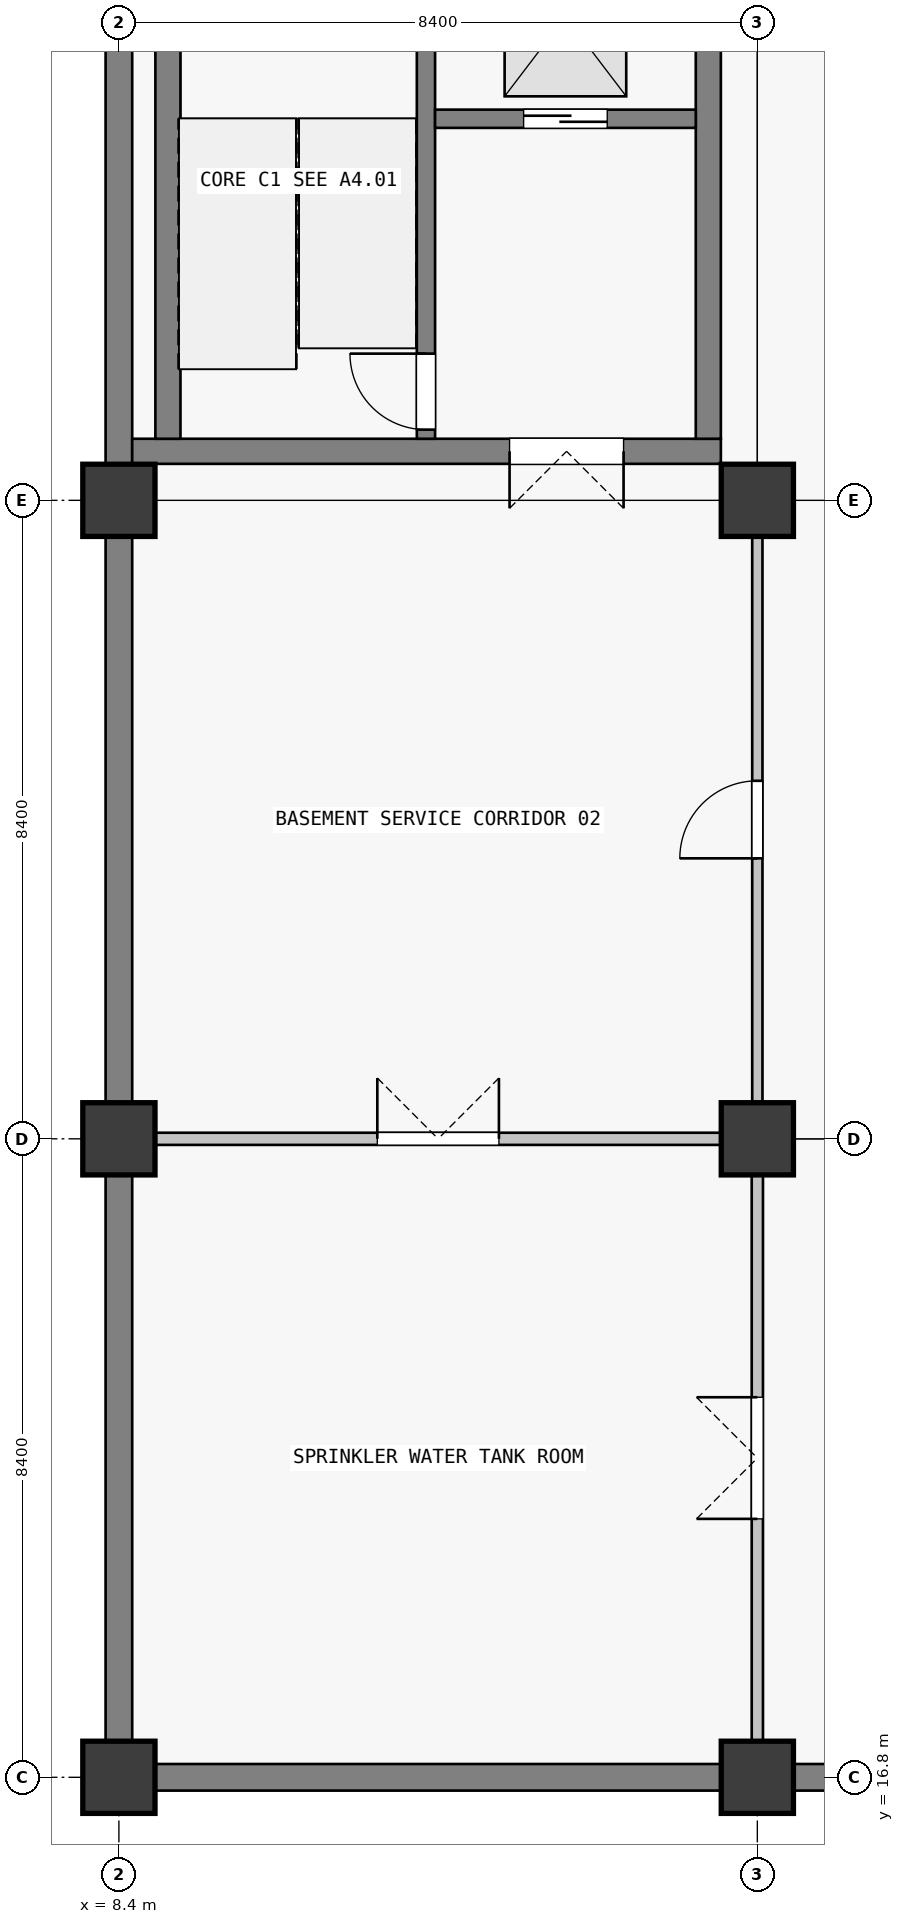
"""IFC4 building model, lengths in metres.
Left out: names, types, materials, properties, quantities, classifications, styles, units other than length and angle.
Written with IfcOpenShell. Run it as: python <this file> out.ifc"""

import sys

from ifc_helpers import new_model, si_unit, direction, frame, frame_2d, origin, origin_2d, place, context, subcontext, project, spatial, rectangle, extrude, element, fill, save


model = new_model("IFC4")
c1 = context("Model", 3, precision=1e-05, world=origin(), true_north=direction((0.0, 1.0)))
c2 = subcontext(c1, "Body", "Model", "MODEL_VIEW")
j1 = project(units=[si_unit("LENGTHUNIT", "METRE"), si_unit("PLANEANGLEUNIT", "RADIAN")], contexts=[c1])
p1 = place(None, origin())
s1 = spatial("IfcSite", under=j1, at=p1, CompositionType="ELEMENT")
p2 = place(p1, origin())
s2 = spatial("IfcBuilding", under=s1, at=p2, CompositionType="ELEMENT")
p3 = place(p2, frame((0.0, 0.0, -4.5)))
s3 = spatial("IfcBuildingStorey", under=s2, at=p3, CompositionType="ELEMENT", Elevation=-4.5)
for number, where, z_axis, x_axis in (
    (1, (8.4, 16.8, -0.35), (0.0, 0.0, 1.0), (1.0, 0.0, 0.0)),
    (2, (8.4, 25.2, -0.35), (0.0, 0.0, 1.0), (1.0, 0.0, 0.0)),
    (3, (8.4, 33.6, -0.35), (0.0, 0.0, 1.0), (1.0, 0.0, 0.0)),
    (4, (16.8, 16.8, -0.35), (0.0, 0.0, 1.0), (1.0, 0.0, 0.0)),
    (5, (16.8, 25.2, -0.35), (0.0, 0.0, 1.0), (1.0, 0.0, 0.0)),
    (6, (16.8, 33.6, -0.35), (0.0, 0.0, 1.0), (1.0, 0.0, 0.0)),
):
    element("IfcColumn", number, at=place(p3, frame(where, z_axis=z_axis, x_axis=x_axis)), inside=s3, PredefinedType="COLUMN", context=c2, shape_type="SweptSolid", body=[
        extrude(rectangle(XDim=0.95, YDim=0.95, at=origin_2d()), origin(), (0.0, 0.0, 1.0), 4.85),
    ])
p4 = place(p3, frame((16.324, 16.8, 0.0), z_axis=(0.0, 0.0, 1.0), x_axis=(-1.0, 0.0, 0.0)))
e7 = element("IfcWall", 7, at=p4, inside=s3, PredefinedType="SOLIDWALL", context=c2, shape_type="SweptSolid", body=[
    extrude(rectangle(XDim=7.448, YDim=0.35, at=frame_2d((3.724, 0.0))), origin(), (0.0, 0.0, 1.0), 3.35),
])
p5 = place(p3, frame((8.4, 17.276, 0.0), z_axis=(0.0, 0.0, 1.0), x_axis=(0.0, 1.0, 0.0)))
e8 = element("IfcWall", 8, at=p5, inside=s3, PredefinedType="SOLIDWALL", context=c2, shape_type="SweptSolid", body=[
    extrude(rectangle(XDim=7.448, YDim=0.35, at=frame_2d((3.724, 0.0))), origin(), (0.0, 0.0, 1.0), 3.35),
])
for number, where, z_axis, x_axis in (
    (9, (8.4, 25.676, 0.0), (0.0, 0.0, 1.0), (0.0, 1.0, 0.0)),
    (10, (8.4, 34.076, 0.0), (0.0, 0.0, 1.0), (0.0, 1.0, 0.0)),
):
    element("IfcWall", number, at=place(p3, frame(where, z_axis=z_axis, x_axis=x_axis)), inside=s3, PredefinedType="SOLIDWALL", context=c2, shape_type="SweptSolid", body=[
        extrude(rectangle(XDim=7.448, YDim=0.35, at=frame_2d((3.724, 0.0))), origin(), (0.0, 0.0, 1.0), 3.35),
    ])
p6 = place(p3, frame((24.724, 16.8, 0.0), z_axis=(0.0, 0.0, 1.0), x_axis=(-1.0, 0.0, 0.0)))
e11 = element("IfcWall", 11, at=p6, inside=s3, PredefinedType="SOLIDWALL", context=c2, shape_type="SweptSolid", body=[
    extrude(rectangle(XDim=7.448, YDim=0.35, at=frame_2d((3.724, 0.0))), origin(), (0.0, 0.0, 1.0), 3.35),
])
p7 = place(p3, frame((16.32, 34.245, -0.35), z_axis=(0.0, 0.0, 1.0), x_axis=(-1.0, 0.0, 0.0)))
e12 = element("IfcWall", 12, at=p7, inside=s3, PredefinedType="SHEAR", context=c2, shape_type="SweptSolid", body=[
    extrude(rectangle(XDim=7.745, YDim=0.33, at=frame_2d((3.873, 0.0))), origin(), (0.0, 0.0, 1.0), 4.85),
])
p8 = place(p7, frame((1.28, 0.0, 0.35)))
e13 = element("IfcOpeningElement", 13, at=p8, cuts=e12, PredefinedType="OPENING", context=c2, shape_type="SweptSolid", body=[
    extrude(rectangle(XDim=1.5, YDim=2.15, at=frame_2d((0.75, 1.075))), frame((0.0, 0.165, 0.0), z_axis=(0.0, -1.0, 0.0), x_axis=(1.0, 0.0, 0.0)), (0.0, 0.0, 1.0), 0.33),
])
for number, where, z_axis, x_axis in (
    (14, (9.045, 34.41, -0.35), (0.0, 0.0, 1.0), (0.0, 1.0, 0.0)),
    (15, (16.155, 41.19, -0.35), (0.0, 0.0, 1.0), (0.0, -1.0, 0.0)),
):
    element("IfcWall", number, at=place(p3, frame(where, z_axis=z_axis, x_axis=x_axis)), inside=s3, PredefinedType="SHEAR", context=c2, shape_type="SweptSolid", body=[
        extrude(rectangle(XDim=6.78, YDim=0.33, at=frame_2d((3.39, 0.0))), origin(), (0.0, 0.0, 1.0), 4.85),
    ])
p9 = place(p3, frame((12.44, 34.41, -0.35), z_axis=(0.0, 0.0, 1.0), x_axis=(0.0, 1.0, 0.0)))
e16 = element("IfcWall", 16, at=p9, inside=s3, PredefinedType="SHEAR", context=c2, shape_type="SweptSolid", body=[
    extrude(rectangle(XDim=6.78, YDim=0.24, at=frame_2d((3.39, 0.0))), origin(), (0.0, 0.0, 1.0), 4.85),
])
p10 = place(p9, frame((0.12, 0.0, 0.35)))
e17 = element("IfcOpeningElement", 17, at=p10, cuts=e16, PredefinedType="OPENING", context=c2, shape_type="SweptSolid", body=[
    extrude(rectangle(XDim=1.0, YDim=2.15, at=frame_2d((0.5, 1.075))), frame((0.0, 0.12, 0.0), z_axis=(0.0, -1.0, 0.0), x_axis=(1.0, 0.0, 0.0)), (0.0, 0.0, 1.0), 0.24),
])
p11 = place(p3, frame((12.56, 38.62, -0.35), z_axis=(0.0, 0.0, 1.0), x_axis=(1.0, 0.0, 0.0)))
e18 = element("IfcWall", 18, at=p11, inside=s3, PredefinedType="SHEAR", context=c2, shape_type="SweptSolid", body=[
    extrude(rectangle(XDim=3.43, YDim=0.24, at=frame_2d((1.715, 0.0))), origin(), (0.0, 0.0, 1.0), 4.85),
])
p12 = place(p11, frame((1.165, 0.0, 0.35)))
e19 = element("IfcOpeningElement", 19, at=p12, cuts=e18, PredefinedType="OPENING", context=c2, shape_type="SweptSolid", body=[
    extrude(rectangle(XDim=1.1, YDim=2.15, at=frame_2d((0.55, 1.075))), frame((0.0, 0.12, 0.0), z_axis=(0.0, -1.0, 0.0), x_axis=(1.0, 0.0, 0.0)), (0.0, 0.0, 1.0), 0.24),
])
p13 = place(p3, frame((8.877, 25.2, 0.0), z_axis=(0.0, 0.0, 1.0), x_axis=(1.0, 0.0, 0.0)))
e20 = element("IfcWall", 20, at=p13, inside=s3, PredefinedType="PARTITIONING", context=c2, shape_type="SweptSolid", body=[
    extrude(rectangle(XDim=7.446, YDim=0.16, at=frame_2d((3.723, 0.0))), origin(), (0.0, 0.0, 1.0), 3.27),
])
p14 = place(p13, frame((2.923, 0.0, 0.0)))
e21 = element("IfcOpeningElement", 21, at=p14, cuts=e20, PredefinedType="OPENING", context=c2, shape_type="SweptSolid", body=[
    extrude(rectangle(XDim=1.6, YDim=2.2, at=frame_2d((0.8, 1.1))), frame((0.0, 0.08, 0.0), z_axis=(0.0, -1.0, 0.0), x_axis=(1.0, 0.0, 0.0)), (0.0, 0.0, 1.0), 0.16),
])
p15 = place(p3, frame((16.8, 17.277, 0.0), z_axis=(0.0, 0.0, 1.0), x_axis=(0.0, 1.0, 0.0)))
e22 = element("IfcWall", 22, at=p15, inside=s3, PredefinedType="PARTITIONING", context=c2, shape_type="SweptSolid", body=[
    extrude(rectangle(XDim=7.446, YDim=0.148, at=frame_2d((3.723, 0.0))), origin(), (0.0, 0.0, 1.0), 3.27),
])
p16 = place(p15, frame((2.923, 0.0, 0.0)))
e23 = element("IfcOpeningElement", 23, at=p16, cuts=e22, PredefinedType="OPENING", context=c2, shape_type="SweptSolid", body=[
    extrude(rectangle(XDim=1.6, YDim=2.2, at=frame_2d((0.8, 1.1))), frame((0.0, 0.074, 0.0), z_axis=(0.0, -1.0, 0.0), x_axis=(1.0, 0.0, 0.0)), (0.0, 0.0, 1.0), 0.148),
])
p17 = place(p3, frame((16.8, 25.677, 0.0), z_axis=(0.0, 0.0, 1.0), x_axis=(0.0, 1.0, 0.0)))
e24 = element("IfcWall", 24, at=p17, inside=s3, PredefinedType="PARTITIONING", context=c2, shape_type="SweptSolid", body=[
    extrude(rectangle(XDim=7.446, YDim=0.135, at=frame_2d((3.723, 0.0))), origin(), (0.0, 0.0, 1.0), 3.27),
])
p18 = place(p17, frame((3.213, 0.0, 0.0)))
e25 = element("IfcOpeningElement", 25, at=p18, cuts=e24, PredefinedType="OPENING", context=c2, shape_type="SweptSolid", body=[
    extrude(rectangle(XDim=1.02, YDim=2.2, at=frame_2d((0.51, 1.1))), frame((0.0, 0.067, 0.0), z_axis=(0.0, -1.0, 0.0), x_axis=(1.0, 0.0, 0.0)), (0.0, 0.0, 1.0), 0.135),
])
p19 = place(p10, origin())
e26 = element("IfcDoor", 26, at=p19, inside=s3, OperationType="SINGLE_SWING_RIGHT", PredefinedType="DOOR", context=c2, shape_type="SweptSolid", body=[
    extrude(rectangle(XDim=1.0, YDim=2.15, at=frame_2d((0.5, 1.075))), frame((0.0, 0.025, 0.0), z_axis=(0.0, -1.0, 0.0), x_axis=(1.0, 0.0, 0.0)), (0.0, 0.0, 1.0), 0.05),
])
fill(e17, e26)
p20 = place(p8, origin())
e27 = element("IfcDoor", 27, at=p20, inside=s3, OperationType="DOUBLE_DOOR_SINGLE_SWING", PredefinedType="DOOR", context=c2, shape_type="SweptSolid", body=[
    extrude(rectangle(XDim=1.5, YDim=2.15, at=frame_2d((0.75, 1.075))), frame((0.0, 0.025, 0.0), z_axis=(0.0, -1.0, 0.0), x_axis=(1.0, 0.0, 0.0)), (0.0, 0.0, 1.0), 0.05),
])
fill(e13, e27)
p21 = place(p12, origin())
e28 = element("IfcDoor", 28, at=p21, inside=s3, OperationType="DOUBLE_DOOR_SLIDING", PredefinedType="DOOR", context=c2, shape_type="SweptSolid", body=[
    extrude(rectangle(XDim=1.1, YDim=2.15, at=frame_2d((0.55, 1.075))), frame((0.0, 0.025, 0.0), z_axis=(0.0, -1.0, 0.0), x_axis=(1.0, 0.0, 0.0)), (0.0, 0.0, 1.0), 0.05),
])
fill(e19, e28)
p22 = place(p14, origin())
e29 = element("IfcDoor", 29, at=p22, inside=s3, OperationType="DOUBLE_DOOR_SINGLE_SWING", PredefinedType="DOOR", context=c2, shape_type="SweptSolid", body=[
    extrude(rectangle(XDim=1.6, YDim=2.2, at=frame_2d((0.8, 1.1))), frame((0.0, 0.025, 0.0), z_axis=(0.0, -1.0, 0.0), x_axis=(1.0, 0.0, 0.0)), (0.0, 0.0, 1.0), 0.05),
])
fill(e21, e29)
p23 = place(p18, origin())
e30 = element("IfcDoor", 30, at=p23, inside=s3, OperationType="SINGLE_SWING_LEFT", PredefinedType="DOOR", context=c2, shape_type="SweptSolid", body=[
    extrude(rectangle(XDim=1.02, YDim=2.2, at=frame_2d((0.51, 1.1))), frame((0.0, 0.025, 0.0), z_axis=(0.0, -1.0, 0.0), x_axis=(1.0, 0.0, 0.0)), (0.0, 0.0, 1.0), 0.05),
])
fill(e25, e30)
p24 = place(p16, origin())
e31 = element("IfcDoor", 31, at=p24, inside=s3, OperationType="DOUBLE_DOOR_SINGLE_SWING", PredefinedType="DOOR", context=c2, shape_type="SweptSolid", body=[
    extrude(rectangle(XDim=1.6, YDim=2.2, at=frame_2d((0.8, 1.1))), frame((0.0, 0.025, 0.0), z_axis=(0.0, -1.0, 0.0), x_axis=(1.0, 0.0, 0.0)), (0.0, 0.0, 1.0), 0.05),
])
fill(e23, e31)
save(model, sys.argv[1])
